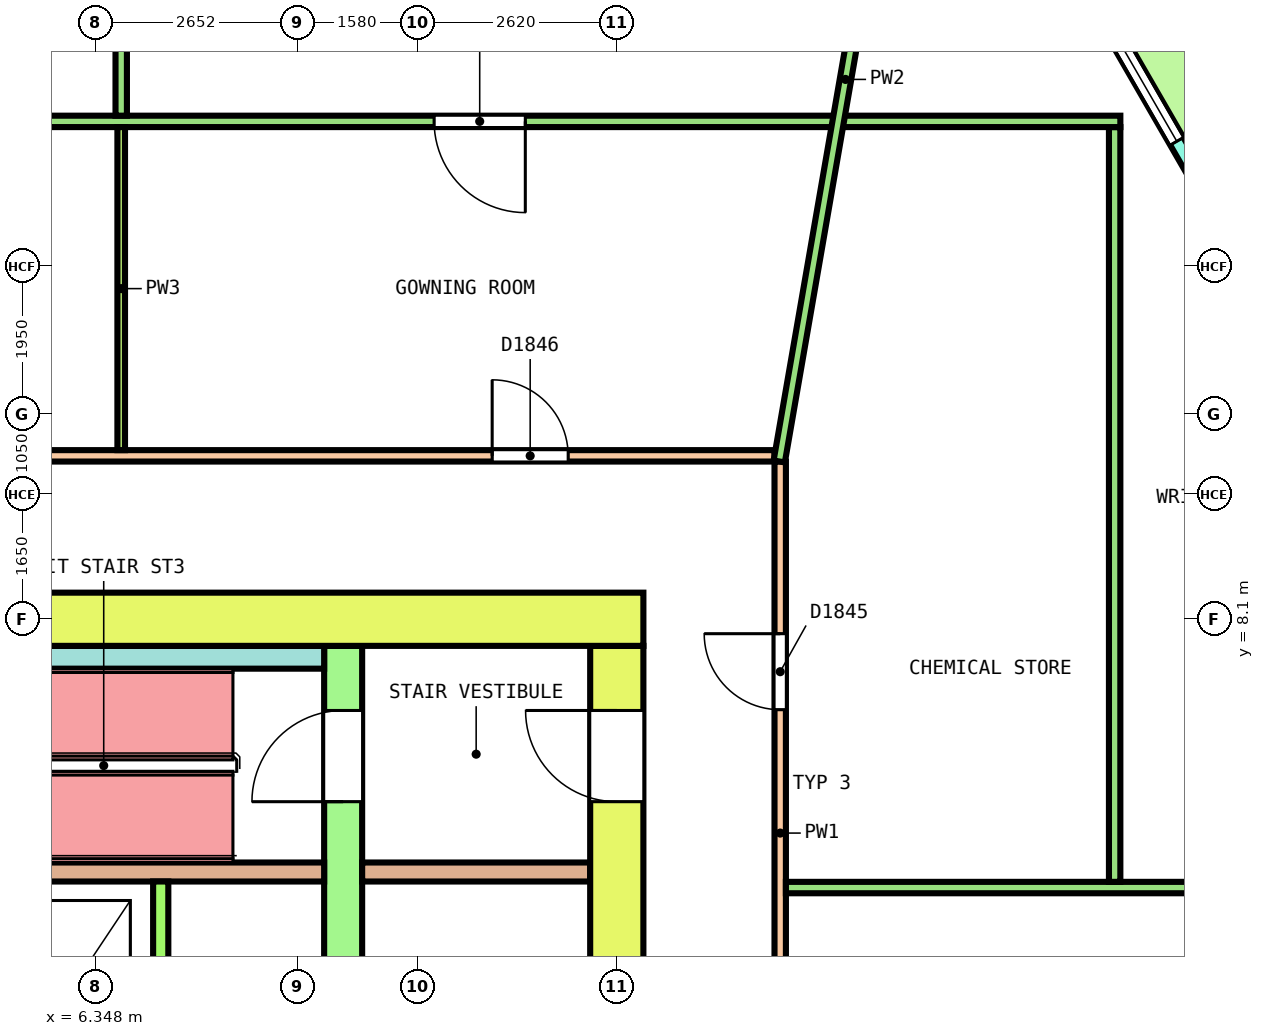
"""IFC4 building model, lengths in metres.
Left out: names, types, materials, properties, quantities, classifications, styles, units other than length and angle.
Written with IfcOpenShell. Run it as: python <this file> out.ifc"""

import sys

from ifc_helpers import new_model, si_unit, direction, frame, frame_2d, origin, place, context, subcontext, project, spatial, polyline, rectangle, outline, extrude, element, fill, save


model = new_model("IFC4")
c1 = context("Model", 3, precision=1e-05, world=origin(), true_north=direction((0.0, 1.0)))
c2 = subcontext(c1, "Body", "Model", "MODEL_VIEW")
j1 = project(units=[si_unit("LENGTHUNIT", "METRE"), si_unit("PLANEANGLEUNIT", "RADIAN")], contexts=[c1])
p1 = place(None, origin())
s1 = spatial("IfcSite", under=j1, at=p1, CompositionType="ELEMENT")
p2 = place(p1, origin())
s2 = spatial("IfcBuilding", under=s1, at=p2, CompositionType="ELEMENT")
p3 = place(p2, frame((0.0, 0.0, 180.4)))
s3 = spatial("IfcBuildingStorey", under=s2, at=p3, CompositionType="ELEMENT", Elevation=180.4)
p4 = place(p3, frame((26.251, 4.543, 0.0), z_axis=(0.0, 0.0, 1.0), x_axis=(-0.499998761798, 0.866026118659, 0.0)))
e1 = element("IfcWall", 1, at=p4, inside=s3, PredefinedType="SOLIDWALL", context=c2, shape_type="SweptSolid", body=[
    extrude(outline(polyline([(-0.027, -0.1), (0.997, -0.1), (2.021, -0.1), (3.046, -0.1), (4.07, -0.1), (5.094, -0.1), (6.118, -0.1), (7.143, -0.1), (8.167, -0.1), (9.191, -0.1), (10.215, -0.1), (11.239, -0.1), (12.263, -0.1), (13.288, -0.1), (14.312, -0.1), (15.336, -0.1), (16.36, -0.1), (17.385, -0.1), (18.409, -0.1), (18.355, 0.1), (17.337, 0.1), (16.319, 0.1), (15.3, 0.1), (14.282, 0.1), (13.264, 0.1), (12.246, 0.1), (11.227, 0.1), (10.209, 0.1), (9.191, 0.1), (8.173, 0.1), (7.155, 0.1), (6.136, 0.1), (5.118, 0.1), (4.1, 0.1), (3.082, 0.1), (2.063, 0.1), (1.045, 0.1), (0.027, 0.1), (-0.027, -0.1)])), origin(), (0.0, 0.0, 1.0), 4.1),
])
p5 = place(p4, frame((0.338, 0.0, 0.1)))
e2 = element("IfcOpeningElement", 2, at=p5, cuts=e1, PredefinedType="OPENING", context=c2, shape_type="SweptSolid", body=[
    extrude(rectangle(XDim=3.0, YDim=2.9, at=frame_2d((1.5, 1.45))), frame((0.0, 0.11, 0.0), z_axis=(0.0, -1.0, 0.0), x_axis=(1.0, 0.0, 0.0)), (0.0, 0.0, 1.0), 0.22),
])
p6 = place(p4, frame((4.015, 0.0, 0.1)))
e3 = element("IfcOpeningElement", 3, at=p6, cuts=e1, PredefinedType="OPENING", context=c2, shape_type="SweptSolid", body=[
    extrude(rectangle(XDim=3.0, YDim=2.9, at=frame_2d((1.5, 1.45))), frame((0.0, 0.11, 0.0), z_axis=(0.0, -1.0, 0.0), x_axis=(1.0, 0.0, 0.0)), (0.0, 0.0, 1.0), 0.22),
])
p7 = place(p4, frame((8.291, 0.0, 0.0)))
e4 = element("IfcOpeningElement", 4, at=p7, cuts=e1, PredefinedType="OPENING", context=c2, shape_type="SweptSolid", body=[
    extrude(rectangle(XDim=1.8, YDim=2.4, at=frame_2d((0.9, 1.2))), frame((0.0, 0.11, 0.0), z_axis=(0.0, -1.0, 0.0), x_axis=(1.0, 0.0, 0.0)), (0.0, 0.0, 1.0), 0.22),
])
p8 = place(p4, frame((8.291, 0.0, 2.55)))
e5 = element("IfcOpeningElement", 5, at=p8, cuts=e1, PredefinedType="OPENING", context=c2, shape_type="SweptSolid", body=[
    extrude(rectangle(XDim=1.8, YDim=0.45, at=frame_2d((0.9, 0.225))), frame((0.0, 0.11, 0.0), z_axis=(0.0, -1.0, 0.0), x_axis=(1.0, 0.0, 0.0)), (0.0, 0.0, 1.0), 0.22),
])
p9 = place(p4, frame((11.367, 0.0, 0.1)))
e6 = element("IfcOpeningElement", 6, at=p9, cuts=e1, PredefinedType="OPENING", context=c2, shape_type="SweptSolid", body=[
    extrude(rectangle(XDim=3.0, YDim=2.9, at=frame_2d((1.5, 1.45))), frame((0.0, 0.11, 0.0), z_axis=(0.0, -1.0, 0.0), x_axis=(1.0, 0.0, 0.0)), (0.0, 0.0, 1.0), 0.22),
])
p10 = place(p4, frame((15.044, 0.0, 0.1)))
e7 = element("IfcOpeningElement", 7, at=p10, cuts=e1, PredefinedType="OPENING", context=c2, shape_type="SweptSolid", body=[
    extrude(rectangle(XDim=3.0, YDim=2.9, at=frame_2d((1.5, 1.45))), frame((0.0, 0.11, 0.0), z_axis=(0.0, -1.0, 0.0), x_axis=(1.0, 0.0, 0.0)), (0.0, 0.0, 1.0), 0.22),
])
p11 = place(p3, frame((-13.55, 8.1, 0.0), z_axis=(0.0, 0.0, 1.0), x_axis=(1.0, 0.0, 0.0)))
e8 = element("IfcWall", 8, at=p11, inside=s3, PredefinedType="SHEAR", context=c2, shape_type="SweptSolid", body=[
    extrude(rectangle(XDim=27.1, YDim=0.7, at=frame_2d((13.55, 0.0))), origin(), (0.0, 0.0, 1.0), 4.1),
])
p12 = place(p11, frame((14.475, 0.0, 0.0)))
e9 = element("IfcOpeningElement", 9, at=p12, cuts=e8, PredefinedType="OPENING", context=c2, shape_type="SweptSolid", body=[
    extrude(rectangle(XDim=1.4, YDim=2.1, at=frame_2d((0.7, 1.05))), frame((0.0, 0.36, 0.0), z_axis=(0.0, -1.0, 0.0), x_axis=(1.0, 0.0, 0.0)), (0.0, 0.0, 1.0), 0.72),
])
p13 = place(p3, frame((13.2, -7.75, 0.0), z_axis=(0.0, 0.0, 1.0), x_axis=(0.0, 1.0, 0.0)))
e10 = element("IfcWall", 10, at=p13, inside=s3, PredefinedType="SHEAR", context=c2, shape_type="SweptSolid", body=[
    extrude(rectangle(XDim=15.5, YDim=0.7, at=frame_2d((7.75, 0.0))), origin(), (0.0, 0.0, 1.0), 4.1),
])
p14 = place(p13, frame((6.55, 0.0, 0.0)))
e11 = element("IfcOpeningElement", 11, at=p14, cuts=e10, PredefinedType="OPENING", context=c2, shape_type="SweptSolid", body=[
    extrude(rectangle(XDim=2.4, YDim=2.1, at=frame_2d((1.2, 1.05))), frame((0.0, 0.36, 0.0), z_axis=(0.0, -1.0, 0.0), x_axis=(1.0, 0.0, 0.0)), (0.0, 0.0, 1.0), 0.72),
])
p15 = place(p13, frame((13.45, 0.0, 0.0)))
e12 = element("IfcOpeningElement", 12, at=p15, cuts=e10, PredefinedType="OPENING", context=c2, shape_type="SweptSolid", body=[
    extrude(rectangle(XDim=1.2, YDim=2.1, at=frame_2d((0.6, 1.05))), frame((0.0, 0.36, 0.0), z_axis=(0.0, -1.0, 0.0), x_axis=(1.0, 0.0, 0.0)), (0.0, 0.0, 1.0), 0.72),
])
p16 = place(p13, frame((0.95, 0.0, 0.0)))
e13 = element("IfcOpeningElement", 13, at=p16, cuts=e10, PredefinedType="OPENING", context=c2, shape_type="SweptSolid", body=[
    extrude(rectangle(XDim=1.0, YDim=2.1, at=frame_2d((0.5, 1.05))), frame((0.0, 0.36, 0.0), z_axis=(0.0, -1.0, 0.0), x_axis=(1.0, 0.0, 0.0)), (0.0, 0.0, 1.0), 0.72),
])
p17 = place(p3, frame((9.6, -7.75, 0.0), z_axis=(0.0, 0.0, 1.0), x_axis=(0.0, 1.0, 0.0)))
e14 = element("IfcWall", 14, at=p17, inside=s3, PredefinedType="SHEAR", context=c2, shape_type="SweptSolid", body=[
    extrude(rectangle(XDim=15.5, YDim=0.5, at=frame_2d((7.75, 0.0))), origin(), (0.0, 0.0, 1.0), 4.1),
])
p18 = place(p17, frame((6.55, 0.0, 0.0)))
e15 = element("IfcOpeningElement", 15, at=p18, cuts=e14, PredefinedType="OPENING", context=c2, shape_type="SweptSolid", body=[
    extrude(rectangle(XDim=2.4, YDim=2.1, at=frame_2d((1.2, 1.05))), frame((0.0, 0.26, 0.0), z_axis=(0.0, -1.0, 0.0), x_axis=(1.0, 0.0, 0.0)), (0.0, 0.0, 1.0), 0.52),
])
p19 = place(p17, frame((13.45, 0.0, 0.0)))
e16 = element("IfcOpeningElement", 16, at=p19, cuts=e14, PredefinedType="OPENING", context=c2, shape_type="SweptSolid", body=[
    extrude(rectangle(XDim=1.2, YDim=2.1, at=frame_2d((0.6, 1.05))), frame((0.0, 0.26, 0.0), z_axis=(0.0, -1.0, 0.0), x_axis=(1.0, 0.0, 0.0)), (0.0, 0.0, 1.0), 0.52),
])
p20 = place(p17, frame((0.95, 0.0, 0.0)))
e17 = element("IfcOpeningElement", 17, at=p20, cuts=e14, PredefinedType="OPENING", context=c2, shape_type="SweptSolid", body=[
    extrude(rectangle(XDim=1.0, YDim=2.1, at=frame_2d((0.5, 1.05))), frame((0.0, 0.26, 0.0), z_axis=(0.0, -1.0, 0.0), x_axis=(1.0, 0.0, 0.0)), (0.0, 0.0, 1.0), 0.52),
])
p21 = place(p3, frame((-9.35, 4.775, 0.0), z_axis=(0.0, 0.0, 1.0), x_axis=(1.0, 0.0, 0.0)))
e18 = element("IfcWall", 18, at=p21, inside=s3, PredefinedType="SOLIDWALL", context=c2, shape_type="SweptSolid", body=[
    extrude(rectangle(XDim=18.7, YDim=0.25, at=frame_2d((9.35, 0.0))), origin(), (0.0, 0.0, 1.0), 4.1),
])
p22 = place(p3, frame((9.85, 4.775, 0.0), z_axis=(0.0, 0.0, 1.0), x_axis=(1.0, 0.0, 0.0)))
e19 = element("IfcWall", 19, at=p22, inside=s3, PredefinedType="SOLIDWALL", context=c2, shape_type="SweptSolid", body=[
    extrude(rectangle(XDim=3.0, YDim=0.25, at=frame_2d((1.5, 0.0))), origin(), (0.0, 0.0, 1.0), 4.1),
])
p23 = place(p3, frame((7.2, 1.75, 0.0), z_axis=(0.0, 0.0, 1.0), x_axis=(0.0, 1.0, 0.0)))
e20 = element("IfcWall", 20, at=p23, inside=s3, PredefinedType="SOLIDWALL", context=c2, shape_type="SweptSolid", body=[
    extrude(rectangle(XDim=2.9, YDim=0.2, at=frame_2d((1.45, 0.0))), origin(), (0.0, 0.0, 1.0), 4.1),
])
p24 = place(p3, frame((3.55, 7.6, 0.0), z_axis=(0.0, 0.0, 1.0), x_axis=(1.0, 0.0, 0.0)))
e21 = element("IfcWall", 21, at=p24, inside=s3, PredefinedType="SOLIDWALL", context=c2, shape_type="SweptSolid", body=[
    extrude(rectangle(XDim=5.8, YDim=0.3, at=frame_2d((2.9, 0.0))), origin(), (0.0, 0.0, 1.0), 4.1),
])
p25 = place(p3, frame((15.35, 0.399, 0.0), z_axis=(0.0, 0.0, 1.0), x_axis=(0.0, 1.0, 0.0)))
e22 = element("IfcWall", 22, at=p25, inside=s3, PredefinedType="PARTITIONING", context=c2, shape_type="SweptSolid", body=[
    extrude(rectangle(XDim=9.776, YDim=0.15, at=frame_2d((4.888, 0.0))), origin(), (0.0, 0.0, 1.0), 3.05),
])
p26 = place(p25, frame((6.511, 0.0, 0.0)))
e23 = element("IfcOpeningElement", 23, at=p26, cuts=e22, PredefinedType="OPENING", context=c2, shape_type="SweptSolid", body=[
    extrude(rectangle(XDim=1.0, YDim=2.1, at=frame_2d((0.5, 1.05))), frame((0.0, 0.085, 0.0), z_axis=(0.0, -1.0, 0.0), x_axis=(1.0, 0.0, 0.0)), (0.0, 0.0, 1.0), 0.17),
])
p27 = place(p3, frame((-15.275, 10.25, 0.0), z_axis=(0.0, 0.0, 1.0), x_axis=(1.0, 0.0, 0.0)))
e24 = element("IfcWall", 24, at=p27, inside=s3, PredefinedType="PARTITIONING", context=c2, shape_type="SweptSolid", body=[
    extrude(rectangle(XDim=30.55, YDim=0.15, at=frame_2d((15.275, 0.0))), origin(), (0.0, 0.0, 1.0), 3.05),
])
p28 = place(p27, frame((26.836, 0.0, 0.0)))
e25 = element("IfcOpeningElement", 25, at=p28, cuts=e24, PredefinedType="OPENING", context=c2, shape_type="SweptSolid", body=[
    extrude(rectangle(XDim=1.0, YDim=2.1, at=frame_2d((0.5, 1.05))), frame((0.0, 0.085, 0.0), z_axis=(0.0, -1.0, 0.0), x_axis=(1.0, 0.0, 0.0)), (0.0, 0.0, 1.0), 0.17),
])
p29 = place(p27, frame((13.785, 0.0, 0.0)))
e26 = element("IfcOpeningElement", 26, at=p29, cuts=e24, PredefinedType="OPENING", context=c2, shape_type="SweptSolid", body=[
    extrude(rectangle(XDim=1.2, YDim=2.1, at=frame_2d((0.6, 1.05))), frame((0.0, 0.085, 0.0), z_axis=(0.0, -1.0, 0.0), x_axis=(1.0, 0.0, 0.0)), (0.0, 0.0, 1.0), 0.17),
])
p30 = place(p3, frame((15.425, 4.57, 0.0), z_axis=(0.0, 0.0, 1.0), x_axis=(1.0, 0.0, 0.0)))
e27 = element("IfcWall", 27, at=p30, inside=s3, PredefinedType="PARTITIONING", context=c2, shape_type="SweptSolid", body=[
    extrude(rectangle(XDim=10.696, YDim=0.15, at=frame_2d((5.348, 0.0))), origin(), (0.0, 0.0, 1.0), 3.05),
])
p31 = place(p30, frame((5.843, 0.0, 0.0)))
e28 = element("IfcOpeningElement", 28, at=p31, cuts=e27, PredefinedType="OPENING", context=c2, shape_type="SweptSolid", body=[
    extrude(rectangle(XDim=1.0, YDim=2.1, at=frame_2d((0.5, 1.05))), frame((0.0, 0.085, 0.0), z_axis=(0.0, -1.0, 0.0), x_axis=(1.0, 0.0, 0.0)), (0.0, 0.0, 1.0), 0.17),
])
p32 = place(p3, frame((19.75, 4.645, 0.0), z_axis=(0.0, 0.0, 1.0), x_axis=(0.0, 1.0, 0.0)))
e29 = element("IfcWall", 29, at=p32, inside=s3, PredefinedType="PARTITIONING", context=c2, shape_type="SweptSolid", body=[
    extrude(rectangle(XDim=9.93, YDim=0.15, at=frame_2d((4.965, 0.0))), origin(), (0.0, 0.0, 1.0), 3.05),
])
p33 = place(p3, frame((-19.675, 14.65, 0.0), z_axis=(0.0, 0.0, 1.0), x_axis=(1.0, 0.0, 0.0)))
e30 = element("IfcWall", 30, at=p33, inside=s3, PredefinedType="PARTITIONING", context=c2, shape_type="SweptSolid", body=[
    extrude(rectangle(XDim=39.5, YDim=0.15, at=frame_2d((19.75, 0.0))), origin(), (0.0, 0.0, 1.0), 3.05),
])
p34 = place(p33, frame((30.472, 0.0, 0.0)))
e31 = element("IfcOpeningElement", 31, at=p34, cuts=e30, PredefinedType="OPENING", context=c2, shape_type="SweptSolid", body=[
    extrude(rectangle(XDim=1.2, YDim=2.1, at=frame_2d((0.6, 1.05))), frame((0.0, 0.085, 0.0), z_axis=(0.0, -1.0, 0.0), x_axis=(1.0, 0.0, 0.0)), (0.0, 0.0, 1.0), 0.17),
])
p35 = place(p3, frame((15.337, 10.176, 0.0), z_axis=(0.0, 0.0, 1.0), x_axis=(0.170860446067, 0.985295238987, 0.0)))
e32 = element("IfcWall", 32, at=p35, inside=s3, PredefinedType="PARTITIONING", context=c2, shape_type="SweptSolid", body=[
    extrude(rectangle(XDim=10.202, YDim=0.15, at=frame_2d((5.101, 0.0))), origin(), (0.0, 0.0, 1.0), 3.05),
])
p36 = place(p3, frame((6.68, 14.725, 0.0), z_axis=(0.0, 0.0, 1.0), x_axis=(0.0, 1.0, 0.0)))
e33 = element("IfcWall", 33, at=p36, inside=s3, PredefinedType="PARTITIONING", context=c2, shape_type="SweptSolid", body=[
    extrude(rectangle(XDim=9.075, YDim=0.15, at=frame_2d((4.538, 0.0))), origin(), (0.0, 0.0, 1.0), 3.05),
])
p37 = place(p36, frame((3.9, 0.0, 0.0)))
e34 = element("IfcOpeningElement", 34, at=p37, cuts=e33, PredefinedType="OPENING", context=c2, shape_type="SweptSolid", body=[
    extrude(rectangle(XDim=1.2, YDim=2.1, at=frame_2d((0.6, 1.05))), frame((0.0, 0.085, 0.0), z_axis=(0.0, -1.0, 0.0), x_axis=(1.0, 0.0, 0.0)), (0.0, 0.0, 1.0), 0.17),
])
p38 = place(p3, frame((6.68, 10.325, 0.0), z_axis=(0.0, 0.0, 1.0), x_axis=(0.0, 1.0, 0.0)))
e35 = element("IfcWall", 35, at=p38, inside=s3, PredefinedType="PARTITIONING", context=c2, shape_type="SweptSolid", body=[
    extrude(rectangle(XDim=4.25, YDim=0.1, at=frame_2d((2.125, 0.0))), origin(), (0.0, 0.0, 1.0), 3.05),
])
p39 = place(p9, origin())
e36 = element("IfcWindow", 36, at=p39, inside=s3, PartitioningType="SINGLE_PANEL", PredefinedType="WINDOW", context=c2, shape_type="SweptSolid", body=[
    extrude(rectangle(XDim=3.0, YDim=2.9, at=frame_2d((1.5, 1.45))), frame((0.0, 0.03, 0.0), z_axis=(0.0, -1.0, 0.0), x_axis=(1.0, 0.0, 0.0)), (0.0, 0.0, 1.0), 0.06),
])
fill(e6, e36)
p40 = place(p19, origin())
e37 = element("IfcDoor", 37, at=p40, inside=s3, OperationType="SINGLE_SWING_LEFT", PredefinedType="DOOR", context=c2, shape_type="SweptSolid", body=[
    extrude(rectangle(XDim=1.2, YDim=2.1, at=frame_2d((0.6, 1.05))), frame((0.0, 0.2, 0.0), z_axis=(0.0, -1.0, 0.0), x_axis=(1.0, 0.0, 0.0)), (0.0, 0.0, 1.0), 0.4),
])
fill(e16, e37)
p41 = place(p15, origin())
e38 = element("IfcDoor", 38, at=p41, inside=s3, OperationType="SINGLE_SWING_RIGHT", PredefinedType="DOOR", context=c2, shape_type="SweptSolid", body=[
    extrude(rectangle(XDim=1.2, YDim=2.1, at=frame_2d((0.6, 1.05))), frame((0.0, 0.3, 0.0), z_axis=(0.0, -1.0, 0.0), x_axis=(1.0, 0.0, 0.0)), (0.0, 0.0, 1.0), 0.6),
])
fill(e12, e38)
p42 = place(p26, origin())
e39 = element("IfcDoor", 39, at=p42, inside=s3, OperationType="SINGLE_SWING_RIGHT", PredefinedType="DOOR", context=c2, shape_type="SweptSolid", body=[
    extrude(rectangle(XDim=1.0, YDim=2.1, at=frame_2d((0.5, 1.05))), frame((0.0, 0.025, 0.0), z_axis=(0.0, -1.0, 0.0), x_axis=(1.0, 0.0, 0.0)), (0.0, 0.0, 1.0), 0.05),
])
fill(e23, e39)
p43 = place(p28, origin())
e40 = element("IfcDoor", 40, at=p43, inside=s3, OperationType="SINGLE_SWING_LEFT", PredefinedType="DOOR", context=c2, shape_type="SweptSolid", body=[
    extrude(rectangle(XDim=1.0, YDim=2.1, at=frame_2d((0.5, 1.05))), frame((0.0, 0.025, 0.0), z_axis=(0.0, -1.0, 0.0), x_axis=(1.0, 0.0, 0.0)), (0.0, 0.0, 1.0), 0.05),
])
fill(e25, e40)
p44 = place(p34, origin())
e41 = element("IfcDoor", 41, at=p44, inside=s3, OperationType="DOUBLE_DOOR_SINGLE_SWING", PredefinedType="DOOR", context=c2, shape_type="SweptSolid", body=[
    extrude(rectangle(XDim=1.2, YDim=2.1, at=frame_2d((0.6, 1.05))), frame((0.0, 0.025, 0.0), z_axis=(0.0, -1.0, 0.0), x_axis=(1.0, 0.0, 0.0)), (0.0, 0.0, 1.0), 0.05),
])
fill(e31, e41)
save(model, sys.argv[1])
